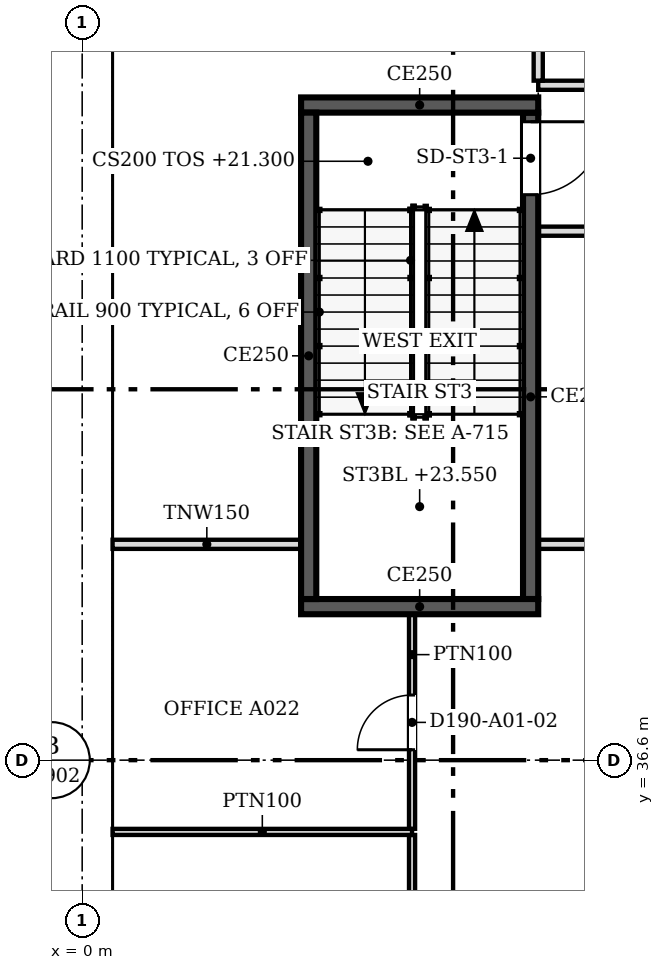
"""IFC4 building model, lengths in metres.
Left out: names, types, materials, properties, quantities, classifications, styles, units other than length and angle.
Written with IfcOpenShell. Run it as: python <this file> out.ifc"""

import sys

from ifc_helpers import new_model, si_unit, direction, frame, frame_2d, origin, place, context, subcontext, project, spatial, polyline, rectangle, outline, extrude, faceted_brep, source, transform, mapped, element, fill, save


model = new_model("IFC4")
c1 = context("Model", 3, precision=1e-05, world=origin(), true_north=direction((0.0, 1.0)))
c2 = subcontext(c1, "Body", "Model", "MODEL_VIEW")
j1 = project(units=[si_unit("LENGTHUNIT", "METRE"), si_unit("PLANEANGLEUNIT", "RADIAN")], contexts=[c1])
p1 = place(None, origin())
s1 = spatial("IfcSite", under=j1, at=p1, CompositionType="ELEMENT")
p2 = place(p1, origin())
s2 = spatial("IfcBuilding", under=s1, at=p2, CompositionType="ELEMENT")
p3 = place(p2, frame((0.0, 0.0, 21.3)))
s3 = spatial("IfcBuildingStorey", under=s2, at=p3, CompositionType="ELEMENT", Elevation=21.3)
m1 = source(origin(), c2, "Body", "Brep", [
    faceted_brep([(0.047, -0.25, 0.0), (3.05, -0.25, 4.5), (0.047, -0.25, 9.0), (0.0, -0.25, 8.929), (0.0, -0.25, 0.071), (0.093, 0.25, 8.93), (3.05, 0.25, 4.5), (0.093, 0.25, 0.07), (0.047, 0.0, 0.0), (0.047, 0.0, 9.0)], [[[0, 1, 2, 3, 4]], [[5, 6, 7]], [[7, 6, 1, 0, 8]], [[6, 5, 9, 2, 1]], [[3, 2, 9]], [[8, 0, 4]], [[7, 8, 4, 3, 9, 5]]]),
])
p4 = place(p3, frame((0.25, 48.8, -4.5), z_axis=(0.0, 0.0, 1.0), x_axis=(0.0, -1.0, 0.0)))
e1 = element("IfcWall", 1, at=p4, inside=s3, PredefinedType="SOLIDWALL", context=c2, shape_type="MappedRepresentation", body=[
    mapped(m1, transform((0.0, 0.0, 0.0), scale=1.0)),
])
m2 = source(origin(), c2, "Body", "SweptSolid", [
    extrude(outline(polyline([(0.247, 0.75), (2.75, 4.5), (0.247, 8.25), (0.247, 0.75)])), frame((0.0, 0.26, 0.0), z_axis=(0.0, -1.0, 0.0), x_axis=(1.0, 0.0, 0.0)), (0.0, 0.0, 1.0), 0.52),
])
p5 = place(p4, origin())
e2 = element("IfcOpeningElement", 2, at=p5, cuts=e1, PredefinedType="OPENING", context=c2, shape_type="MappedRepresentation", body=[
    mapped(m2, transform((0.0, 0.0, 0.0), scale=1.0)),
])
m3 = source(origin(), c2, "Body", "SweptSolid", [
    extrude(outline(polyline([(3.05, 0.0), (6.1, 4.5), (3.05, 9.0), (0.0, 4.5), (3.05, 0.0)])), frame((0.0, 0.25, 0.0), z_axis=(0.0, -1.0, 0.0), x_axis=(1.0, 0.0, 0.0)), (0.0, 0.0, 1.0), 0.5),
])
p6 = place(p3, frame((0.25, 45.75, -4.5), z_axis=(0.0, 0.0, 1.0), x_axis=(0.0, -1.0, 0.0)))
e3 = element("IfcWall", 3, at=p6, inside=s3, PredefinedType="SOLIDWALL", context=c2, shape_type="MappedRepresentation", body=[
    mapped(m3, transform((0.0, 0.0, 0.0), scale=1.0)),
])
m4 = source(origin(), c2, "Body", "SweptSolid", [
    extrude(outline(polyline([(3.05, 0.446), (5.798, 4.5), (3.05, 8.554), (0.302, 4.5), (3.05, 0.446)])), frame((0.0, 0.26, 0.0), z_axis=(0.0, -1.0, 0.0), x_axis=(1.0, 0.0, 0.0)), (0.0, 0.0, 1.0), 0.52),
])
p7 = place(p6, origin())
e4 = element("IfcOpeningElement", 4, at=p7, cuts=e3, PredefinedType="OPENING", context=c2, shape_type="MappedRepresentation", body=[
    mapped(m4, transform((0.0, 0.0, 0.0), scale=1.0)),
])
m5 = source(origin(), c2, "Body", "Brep", [
    faceted_brep([(3.05, -0.25, 0.0), (6.1, -0.25, 4.5), (6.1, -0.25, 4.5), (3.05, -0.25, 9.0), (0.0, -0.25, 4.5), (0.0, 0.25, 4.5), (3.05, 0.25, 9.0), (6.1, 0.25, 4.5), (6.1, 0.25, 4.5), (3.05, 0.25, 0.0)], [[[0, 1, 2, 3, 4]], [[5, 6, 7, 8, 9]], [[9, 8, 1, 0]], [[7, 6, 3, 2]], [[6, 5, 4, 3]], [[5, 9, 0, 4]], [[1, 8, 7, 2]]]),
])
p8 = place(p3, frame((0.25, 39.65, -4.5), z_axis=(0.0, 0.0, 1.0), x_axis=(0.0, -1.0, 0.0)))
e5 = element("IfcWall", 5, at=p8, inside=s3, PredefinedType="SOLIDWALL", context=c2, shape_type="MappedRepresentation", body=[
    mapped(m5, transform((0.0, 0.0, 0.0), scale=1.0)),
])
p9 = place(p8, origin())
e6 = element("IfcOpeningElement", 6, at=p9, cuts=e5, PredefinedType="OPENING", context=c2, shape_type="MappedRepresentation", body=[
    mapped(m4, transform((0.0, 0.0, 0.0), scale=1.0)),
])
m6 = source(origin(), c2, "Body", "Brep", [
    faceted_brep([(3.003, -0.25, 0.0), (6.053, -0.25, 4.5), (0.0, -0.25, 4.5), (0.047, 0.25, 4.5), (6.053, 0.25, 4.5), (3.003, 0.25, 0.0), (0.047, 0.25, 4.43), (0.0, 0.0, 4.5)], [[[0, 1, 2]], [[3, 4, 5, 6]], [[5, 4, 1, 0]], [[4, 3, 7, 2, 1]], [[6, 5, 0, 2, 7]], [[6, 7, 3]]]),
])
p10 = place(p3, frame((0.25, 48.753, 0.0), z_axis=(0.0, 0.0, 1.0), x_axis=(0.0, -1.0, 0.0)))
e7 = element("IfcWall", 7, at=p10, inside=s3, PredefinedType="SOLIDWALL", context=c2, shape_type="MappedRepresentation", body=[
    mapped(m6, transform((0.0, 0.0, 0.0), scale=1.0)),
])
m7 = source(origin(), c2, "Body", "SweptSolid", [
    extrude(outline(polyline([(3.005, 0.448), (5.582, 4.25), (0.468, 4.25), (3.005, 0.448)])), frame((0.0, 0.26, 0.0), z_axis=(0.0, -1.0, 0.0), x_axis=(1.0, 0.0, 0.0)), (0.0, 0.0, 1.0), 0.52),
])
p11 = place(p10, origin())
e8 = element("IfcOpeningElement", 8, at=p11, cuts=e7, PredefinedType="OPENING", context=c2, shape_type="MappedRepresentation", body=[
    mapped(m7, transform((0.0, 0.0, 0.0), scale=1.0)),
])
m8 = source(origin(), c2, "Body", "Brep", [
    faceted_brep([(3.05, -0.25, 0.0), (6.1, -0.25, 4.5), (6.1, -0.25, 4.5), (0.0, -0.25, 4.5), (0.0, 0.25, 4.5), (6.1, 0.25, 4.5), (6.1, 0.25, 4.5), (3.05, 0.25, 0.0)], [[[0, 1, 2, 3]], [[4, 5, 6, 7]], [[7, 6, 1, 0]], [[5, 4, 3, 2]], [[4, 7, 0, 3]], [[1, 6, 5, 2]]]),
])
p12 = place(p3, frame((0.25, 42.7, 0.0), z_axis=(0.0, 0.0, 1.0), x_axis=(0.0, -1.0, 0.0)))
e9 = element("IfcWall", 9, at=p12, inside=s3, PredefinedType="SOLIDWALL", context=c2, shape_type="MappedRepresentation", body=[
    mapped(m8, transform((0.0, 0.0, 0.0), scale=1.0)),
])
m9 = source(origin(), c2, "Body", "SweptSolid", [
    extrude(outline(polyline([(3.05, 0.446), (5.629, 4.25), (0.471, 4.25), (3.05, 0.446)])), frame((0.0, 0.26, 0.0), z_axis=(0.0, -1.0, 0.0), x_axis=(1.0, 0.0, 0.0)), (0.0, 0.0, 1.0), 0.52),
])
p13 = place(p12, origin())
e10 = element("IfcOpeningElement", 10, at=p13, cuts=e9, PredefinedType="OPENING", context=c2, shape_type="MappedRepresentation", body=[
    mapped(m9, transform((0.0, 0.0, 0.0), scale=1.0)),
])
m10 = source(origin(), c2, "Body", "SweptSolid", [
    extrude(outline(polyline([(3.05, 0.0), (6.1, 4.5), (0.0, 4.5), (3.05, 0.0)])), frame((0.0, 0.25, 0.0), z_axis=(0.0, -1.0, 0.0), x_axis=(1.0, 0.0, 0.0)), (0.0, 0.0, 1.0), 0.5),
])
p14 = place(p3, frame((0.25, 36.6, 0.0), z_axis=(0.0, 0.0, 1.0), x_axis=(0.0, -1.0, 0.0)))
e11 = element("IfcWall", 11, at=p14, inside=s3, PredefinedType="SOLIDWALL", context=c2, shape_type="MappedRepresentation", body=[
    mapped(m10, transform((0.0, 0.0, 0.0), scale=1.0)),
])
p15 = place(p14, origin())
e12 = element("IfcOpeningElement", 12, at=p15, cuts=e11, PredefinedType="OPENING", context=c2, shape_type="MappedRepresentation", body=[
    mapped(m9, transform((0.0, 0.0, 0.0), scale=1.0)),
])
p16 = place(p3, frame((7.5, 39.125, 0.0), z_axis=(0.0, 0.0, 1.0), x_axis=(-1.0, 0.0, 0.0)))
e13 = element("IfcWall", 13, at=p16, inside=s3, PredefinedType="SOLIDWALL", context=c2, shape_type="SweptSolid", body=[
    extrude(rectangle(XDim=3.9, YDim=0.25, at=frame_2d((1.95, 0.0))), origin(), (0.0, 0.0, 1.0), 4.5),
])
p17 = place(p3, frame((3.725, 39.25, 0.0), z_axis=(0.0, 0.0, 1.0), x_axis=(0.0, 1.0, 0.0)))
e14 = element("IfcWall", 14, at=p17, inside=s3, PredefinedType="SOLIDWALL", context=c2, shape_type="SweptSolid", body=[
    extrude(rectangle(XDim=8.0, YDim=0.25, at=frame_2d((4.0, 0.0))), origin(), (0.0, 0.0, 1.0), 4.5),
])
p18 = place(p3, frame((3.6, 47.375, 0.0), z_axis=(0.0, 0.0, 1.0), x_axis=(1.0, 0.0, 0.0)))
e15 = element("IfcWall", 15, at=p18, inside=s3, PredefinedType="SOLIDWALL", context=c2, shape_type="SweptSolid", body=[
    extrude(rectangle(XDim=3.9, YDim=0.25, at=frame_2d((1.95, 0.0))), origin(), (0.0, 0.0, 1.0), 4.5),
])
p19 = place(p3, frame((7.375, 47.25, 0.0), z_axis=(0.0, 0.0, 1.0), x_axis=(0.0, -1.0, 0.0)))
e16 = element("IfcWall", 16, at=p19, inside=s3, PredefinedType="SOLIDWALL", context=c2, shape_type="SweptSolid", body=[
    extrude(rectangle(XDim=8.0, YDim=0.25, at=frame_2d((4.0, 0.0))), origin(), (0.0, 0.0, 1.0), 4.5),
])
m11 = source(origin(), c2, "Body", "SweptSolid", [
    extrude(rectangle(XDim=1.2, YDim=2.1, at=frame_2d((0.6, 1.05))), frame((0.0, 0.135, 0.0), z_axis=(0.0, -1.0, 0.0), x_axis=(1.0, 0.0, 0.0)), (0.0, 0.0, 1.0), 0.27),
])
p20 = place(p19, frame((0.15, 0.0, 0.0)))
e17 = element("IfcOpeningElement", 17, at=p20, cuts=e16, PredefinedType="OPENING", context=c2, shape_type="MappedRepresentation", body=[
    mapped(m11, transform((0.0, 0.0, 0.0), scale=1.0)),
])
p21 = place(p3, frame((5.425, 31.076, 0.0), z_axis=(0.0, 0.0, 1.0), x_axis=(0.0, 1.0, 0.0)))
e18 = element("IfcWall", 18, at=p21, inside=s3, PredefinedType="PARTITIONING", context=c2, shape_type="SweptSolid", body=[
    extrude(rectangle(XDim=4.293, YDim=0.1, at=frame_2d((2.147, 0.0))), origin(), (0.0, 0.0, 1.0), 3.767),
])
m12 = source(origin(), c2, "Body", "SweptSolid", [
    extrude(rectangle(XDim=0.9, YDim=2.1, at=frame_2d((0.45, 1.05))), frame((0.0, 0.06, 0.0), z_axis=(0.0, -1.0, 0.0), x_axis=(1.0, 0.0, 0.0)), (0.0, 0.0, 1.0), 0.12),
])
p22 = place(p21, frame((1.7, 0.0, 0.0)))
e19 = element("IfcOpeningElement", 19, at=p22, cuts=e18, PredefinedType="OPENING", context=c2, shape_type="MappedRepresentation", body=[
    mapped(m12, transform((0.0, 0.0, 0.0), scale=1.0)),
])
p23 = place(p3, frame((0.5, 35.42, 0.0), z_axis=(0.0, 0.0, 1.0), x_axis=(1.0, 0.0, 0.0)))
e20 = element("IfcWall", 20, at=p23, inside=s3, PredefinedType="PARTITIONING", context=c2, shape_type="SweptSolid", body=[
    extrude(rectangle(XDim=4.925, YDim=0.1, at=frame_2d((2.462, 0.0))), origin(), (0.0, 0.0, 1.0), 3.767),
])
p24 = place(p3, frame((5.425, 35.471, 0.0), z_axis=(0.0, 0.0, 1.0), x_axis=(0.0, 1.0, 0.0)))
e21 = element("IfcWall", 21, at=p24, inside=s3, PredefinedType="PARTITIONING", context=c2, shape_type="SweptSolid", body=[
    extrude(rectangle(XDim=3.529, YDim=0.1, at=frame_2d((1.764, 0.0))), origin(), (0.0, 0.0, 1.0), 3.767),
])
p25 = place(p24, frame((1.3, 0.0, 0.0)))
e22 = element("IfcOpeningElement", 22, at=p25, cuts=e21, PredefinedType="OPENING", context=c2, shape_type="MappedRepresentation", body=[
    mapped(m12, transform((0.0, 0.0, 0.0), scale=1.0)),
])
p26 = place(p3, frame((0.5, 40.15, 0.0), z_axis=(0.0, 0.0, 1.0), x_axis=(1.0, 0.0, 0.0)))
e23 = element("IfcWall", 23, at=p26, inside=s3, PredefinedType="PARTITIONING", context=c2, shape_type="SweptSolid", body=[
    extrude(rectangle(XDim=3.1, YDim=0.15, at=frame_2d((1.55, 0.0))), origin(), (0.0, 0.0, 1.0), 3.767),
])
p27 = place(p3, frame((7.5, 40.15, 0.0), z_axis=(0.0, 0.0, 1.0), x_axis=(1.0, 0.0, 0.0)))
e24 = element("IfcWall", 24, at=p27, inside=s3, PredefinedType="PARTITIONING", context=c2, shape_type="SweptSolid", body=[
    extrude(rectangle(XDim=20.524, YDim=0.15, at=frame_2d((10.262, 0.0))), origin(), (0.0, 0.0, 1.0), 3.767),
])
p28 = place(p3, frame((7.5, 45.3, 0.0), z_axis=(0.0, 0.0, 1.0), x_axis=(1.0, 0.0, 0.0)))
e25 = element("IfcWall", 25, at=p28, inside=s3, PredefinedType="PARTITIONING", context=c2, shape_type="SweptSolid", body=[
    extrude(rectangle(XDim=20.6, YDim=0.15, at=frame_2d((10.3, 0.0))), origin(), (0.0, 0.0, 1.0), 3.767),
])
p29 = place(p3, frame((7.5, 47.7, 0.0), z_axis=(0.0, 0.0, 1.0), x_axis=(1.0, 0.0, 0.0)))
e26 = element("IfcWall", 26, at=p29, inside=s3, PredefinedType="PARTITIONING", context=c2, shape_type="SweptSolid", body=[
    extrude(rectangle(XDim=20.6, YDim=0.15, at=frame_2d((10.3, 0.0))), origin(), (0.0, 0.0, 1.0), 3.767),
])
m13 = source(origin(), c2, "Body", "SweptSolid", [
    extrude(rectangle(XDim=1.8, YDim=2.1, at=frame_2d((0.9, 1.05))), frame((0.0, 0.085, 0.0), z_axis=(0.0, -1.0, 0.0), x_axis=(1.0, 0.0, 0.0)), (0.0, 0.0, 1.0), 0.17),
])
p30 = place(p29, frame((14.501, 0.0, 0.0)))
e27 = element("IfcOpeningElement", 27, at=p30, cuts=e26, PredefinedType="OPENING", context=c2, shape_type="MappedRepresentation", body=[
    mapped(m13, transform((0.0, 0.0, 0.0), scale=1.0)),
])
p31 = place(p29, frame((5.3, 0.0, 0.0)))
e28 = element("IfcOpeningElement", 28, at=p31, cuts=e26, PredefinedType="OPENING", context=c2, shape_type="MappedRepresentation", body=[
    mapped(m13, transform((0.0, 0.0, 0.0), scale=1.0)),
])
p32 = place(p3, frame((7.5, 47.776, 0.0), z_axis=(0.0, 0.0, 1.0), x_axis=(0.0, 1.0, 0.0)))
e29 = element("IfcWall", 29, at=p32, inside=s3, PredefinedType="PARTITIONING", context=c2, shape_type="SweptSolid", body=[
    extrude(rectangle(XDim=3.348, YDim=0.15, at=frame_2d((1.674, 0.0))), origin(), (0.0, 0.0, 1.0), 3.767),
])
m14 = source(origin(), c2, "Body", "SweptSolid", [
    extrude(rectangle(XDim=0.9, YDim=2.1, at=frame_2d((0.45, 1.05))), frame((0.0, 0.085, 0.0), z_axis=(0.0, -1.0, 0.0), x_axis=(1.0, 0.0, 0.0)), (0.0, 0.0, 1.0), 0.17),
])
p33 = place(p32, frame((1.2, 0.0, 0.0)))
e30 = element("IfcOpeningElement", 30, at=p33, cuts=e29, PredefinedType="OPENING", context=c2, shape_type="MappedRepresentation", body=[
    mapped(m14, transform((0.0, 0.0, 0.0), scale=1.0)),
])
m15 = source(origin(), c2, "Body", "SweptSolid", [
    extrude(rectangle(XDim=1.2, YDim=2.1, at=frame_2d((0.6, 1.05))), frame((0.0, 0.025, 0.0), z_axis=(0.0, -1.0, 0.0), x_axis=(1.0, 0.0, 0.0)), (0.0, 0.0, 1.0), 0.05),
])
p34 = place(p20, origin())
e31 = element("IfcDoor", 31, at=p34, inside=s3, OperationType="SINGLE_SWING_LEFT", PredefinedType="DOOR", context=c2, shape_type="MappedRepresentation", body=[
    mapped(m15, transform((0.0, 0.0, 0.0), scale=1.0)),
])
fill(e17, e31)
m16 = source(origin(), c2, "Body", "SweptSolid", [
    extrude(rectangle(XDim=0.9, YDim=2.1, at=frame_2d((0.45, 1.05))), frame((0.0, 0.025, 0.0), z_axis=(0.0, -1.0, 0.0), x_axis=(1.0, 0.0, 0.0)), (0.0, 0.0, 1.0), 0.05),
])
p35 = place(p25, origin())
e32 = element("IfcDoor", 32, at=p35, inside=s3, OperationType="SINGLE_SWING_LEFT", PredefinedType="DOOR", context=c2, shape_type="MappedRepresentation", body=[
    mapped(m16, transform((0.0, 0.0, 0.0), scale=1.0)),
])
fill(e22, e32)
save(model, sys.argv[1])
